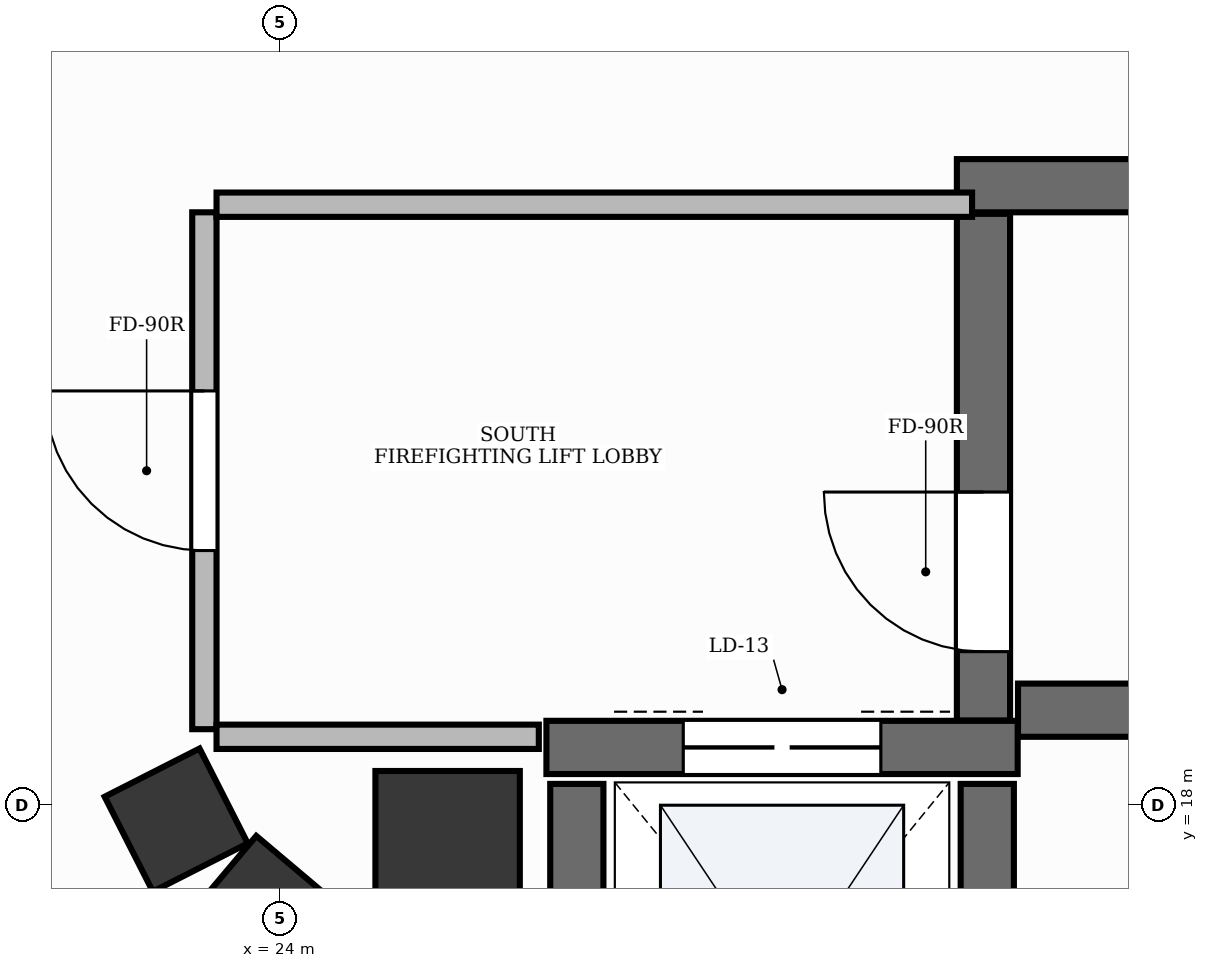
"""IFC4 building model, lengths in metres.
Left out: names, types, materials, properties, quantities, classifications, styles, units other than length and angle.
Written with IfcOpenShell. Run it as: python <this file> out.ifc"""

import sys

from ifc_helpers import new_model, si_unit, direction, frame, frame_2d, origin, origin_2d, place, context, subcontext, project, spatial, rectangle, extrude, element, fill, save


model = new_model("IFC4")
c1 = context("Model", 3, precision=1e-05, world=origin(), true_north=direction((0.0, 1.0)))
c2 = subcontext(c1, "Body", "Model", "MODEL_VIEW")
j1 = project(units=[si_unit("LENGTHUNIT", "METRE"), si_unit("PLANEANGLEUNIT", "RADIAN")], contexts=[c1])
p1 = place(None, origin())
s1 = spatial("IfcSite", under=j1, at=p1, CompositionType="ELEMENT")
p2 = place(p1, origin())
s2 = spatial("IfcBuilding", under=s1, at=p2, CompositionType="ELEMENT")
p3 = place(p2, frame((0.0, 0.0, 335.4)))
s3 = spatial("IfcBuildingStorey", under=s2, at=p3, CompositionType="ELEMENT", Elevation=335.4)
p4 = place(p3, frame((28.852, 18.625, 0.0), z_axis=(0.0, 0.0, 1.0), x_axis=(1.0, 0.0, 0.0)))
e1 = element("IfcWall", 1, at=p4, inside=s3, PredefinedType="SHEAR", context=c2, shape_type="SweptSolid", body=[
    extrude(rectangle(XDim=8.148, YDim=0.35, at=frame_2d((4.074, 0.0))), origin(), (0.0, 0.0, 1.0), 3.88),
])
p5 = place(p3, frame((28.45, 22.075, 0.0), z_axis=(0.0, 0.0, 1.0), x_axis=(1.0, 0.0, 0.0)))
e2 = element("IfcWall", 2, at=p5, inside=s3, PredefinedType="SHEAR", context=c2, shape_type="SweptSolid", body=[
    extrude(rectangle(XDim=8.55, YDim=0.35, at=frame_2d((4.275, 0.0))), origin(), (0.0, 0.0, 1.0), 3.88),
])
p6 = place(p3, frame((28.625, 18.557, 0.0), z_axis=(0.0, 0.0, 1.0), x_axis=(0.0, 1.0, 0.0)))
e3 = element("IfcWall", 3, at=p6, inside=s3, PredefinedType="SHEAR", context=c2, shape_type="SweptSolid", body=[
    extrude(rectangle(XDim=3.333, YDim=0.35, at=frame_2d((1.667, 0.0))), origin(), (0.0, 0.0, 1.0), 3.88),
])
p7 = place(p6, frame((0.453, 0.0, 0.0)))
e4 = element("IfcOpeningElement", 4, at=p7, cuts=e3, PredefinedType="OPENING", context=c2, shape_type="SweptSolid", body=[
    extrude(rectangle(XDim=1.05, YDim=2.15, at=frame_2d((0.525, 1.075))), frame((0.0, 0.19, 0.0), z_axis=(0.0, -1.0, 0.0), x_axis=(1.0, 0.0, 0.0)), (0.0, 0.0, 1.0), 0.38),
])
p8 = place(p3, frame((25.75, 18.38, 0.0), z_axis=(0.0, 0.0, 1.0), x_axis=(1.0, 0.0, 0.0)))
e5 = element("IfcWall", 5, at=p8, inside=s3, PredefinedType="SHEAR", context=c2, shape_type="SweptSolid", body=[
    extrude(rectangle(XDim=3.1, YDim=0.35, at=frame_2d((1.55, 0.0))), origin(), (0.0, 0.0, 1.0), 3.88),
])
p9 = place(p8, frame((0.9, 0.0, 0.0)))
e6 = element("IfcOpeningElement", 6, at=p9, cuts=e5, PredefinedType="OPENING", context=c2, shape_type="SweptSolid", body=[
    extrude(rectangle(XDim=1.3, YDim=2.2, at=frame_2d((0.65, 1.1))), frame((0.0, 0.19, 0.0), z_axis=(0.0, -1.0, 0.0), x_axis=(1.0, 0.0, 0.0)), (0.0, 0.0, 1.0), 0.38),
])
for number, where, z_axis, x_axis in (
    (7, (25.95, 15.44, 0.0), (0.0, 0.0, 1.0), (0.0, 1.0, 0.0)),
    (8, (28.65, 15.44, 0.0), (0.0, 0.0, 1.0), (0.0, 1.0, 0.0)),
):
    element("IfcWall", number, at=place(p3, frame(where, z_axis=z_axis, x_axis=x_axis)), inside=s3, PredefinedType="SHEAR", context=c2, shape_type="SweptSolid", body=[
        extrude(rectangle(XDim=2.7, YDim=0.35, at=frame_2d((1.35, 0.0))), origin(), (0.0, 0.0, 1.0), 3.88),
    ])
p10 = place(p3, frame((25.1, 17.75, -0.0), z_axis=(0.0, 0.0, 1.0), x_axis=(1.0, 0.0, 0.0)))
e9 = element("IfcColumn", 9, at=p10, inside=s3, PredefinedType="PILASTER", context=c2, shape_type="SweptSolid", body=[
    extrude(rectangle(XDim=0.95, YDim=0.95, at=origin_2d()), origin(), (0.0, 0.0, 1.0), 3.881),
])
for number, where, z_axis, x_axis in (
    (10, (23.315, 17.902, -0.0), (0.0, 0.0, 1.0), (-0.453, 0.891, 0.0)),
    (11, (23.883, 17.305, -0.0), (0.0, 0.0, 1.0), (-0.764, 0.645, 0.0)),
):
    element("IfcColumn", number, at=place(p3, frame(where, z_axis=z_axis, x_axis=x_axis)), inside=s3, PredefinedType="COLUMN", context=c2, shape_type="SweptSolid", body=[
        extrude(rectangle(XDim=0.7, YDim=0.7, at=origin_2d()), origin(), (0.0, 0.0, 1.0), 3.881),
    ])
p11 = place(p3, frame((21.187, 18.105, 0.0), z_axis=(0.0, 0.0, 1.0), x_axis=(0.642719373216, -0.766101695137, 0.0)))
e12 = element("IfcWall", 12, at=p11, inside=s3, PredefinedType="STANDARD", context=c2, shape_type="SweptSolid", body=[
    extrude(rectangle(XDim=2.072, YDim=0.24, at=frame_2d((1.036, 0.0))), origin(), (0.0, 0.0, 1.0), 3.88),
])
p12 = place(p3, frame((23.5, 18.5, 0.0), z_axis=(0.0, 0.0, 1.0), x_axis=(0.0, 1.0, 0.0)))
e13 = element("IfcWall", 13, at=p12, inside=s3, PredefinedType="PARTITIONING", context=c2, shape_type="SweptSolid", body=[
    extrude(rectangle(XDim=3.4, YDim=0.16, at=frame_2d((1.7, 0.0))), origin(), (0.0, 0.0, 1.0), 2.74),
])
p13 = place(p12, frame((1.175, 0.0, 0.0)))
e14 = element("IfcOpeningElement", 14, at=p13, cuts=e13, PredefinedType="OPENING", context=c2, shape_type="SweptSolid", body=[
    extrude(rectangle(XDim=1.05, YDim=2.15, at=frame_2d((0.525, 1.075))), frame((0.0, 0.095, 0.0), z_axis=(0.0, -1.0, 0.0), x_axis=(1.0, 0.0, 0.0)), (0.0, 0.0, 1.0), 0.19),
])
p14 = place(p3, frame((23.58, 21.95, 0.0), z_axis=(0.0, 0.0, 1.0), x_axis=(1.0, 0.0, 0.0)))
e15 = element("IfcWall", 15, at=p14, inside=s3, PredefinedType="PARTITIONING", context=c2, shape_type="SweptSolid", body=[
    extrude(rectangle(XDim=4.97, YDim=0.16, at=frame_2d((2.485, 0.0))), origin(), (0.0, 0.0, 1.0), 2.74),
])
p15 = place(p3, frame((23.58, 18.45, 0.0), z_axis=(0.0, 0.0, 1.0), x_axis=(1.0, 0.0, 0.0)))
e16 = element("IfcWall", 16, at=p15, inside=s3, PredefinedType="PARTITIONING", context=c2, shape_type="SweptSolid", body=[
    extrude(rectangle(XDim=2.12, YDim=0.16, at=frame_2d((1.06, 0.0))), origin(), (0.0, 0.0, 1.0), 2.74),
])
p16 = place(p7, origin())
e17 = element("IfcDoor", 17, at=p16, inside=s3, OperationType="SINGLE_SWING_RIGHT", PredefinedType="DOOR", context=c2, shape_type="SweptSolid", body=[
    extrude(rectangle(XDim=1.05, YDim=2.15, at=frame_2d((0.525, 1.075))), frame((0.0, 0.025, 0.0), z_axis=(0.0, -1.0, 0.0), x_axis=(1.0, 0.0, 0.0)), (0.0, 0.0, 1.0), 0.05),
])
fill(e4, e17)
p17 = place(p9, origin())
e18 = element("IfcDoor", 18, at=p17, inside=s3, OperationType="DOUBLE_DOOR_SLIDING", PredefinedType="DOOR", context=c2, shape_type="SweptSolid", body=[
    extrude(rectangle(XDim=1.3, YDim=2.2, at=frame_2d((0.65, 1.1))), frame((0.0, 0.025, 0.0), z_axis=(0.0, -1.0, 0.0), x_axis=(1.0, 0.0, 0.0)), (0.0, 0.0, 1.0), 0.05),
])
fill(e6, e18)
p18 = place(p13, origin())
e19 = element("IfcDoor", 19, at=p18, inside=s3, OperationType="SINGLE_SWING_RIGHT", PredefinedType="DOOR", context=c2, shape_type="SweptSolid", body=[
    extrude(rectangle(XDim=1.05, YDim=2.15, at=frame_2d((0.525, 1.075))), frame((0.0, 0.025, 0.0), z_axis=(0.0, -1.0, 0.0), x_axis=(1.0, 0.0, 0.0)), (0.0, 0.0, 1.0), 0.05),
])
fill(e14, e19)
save(model, sys.argv[1])
